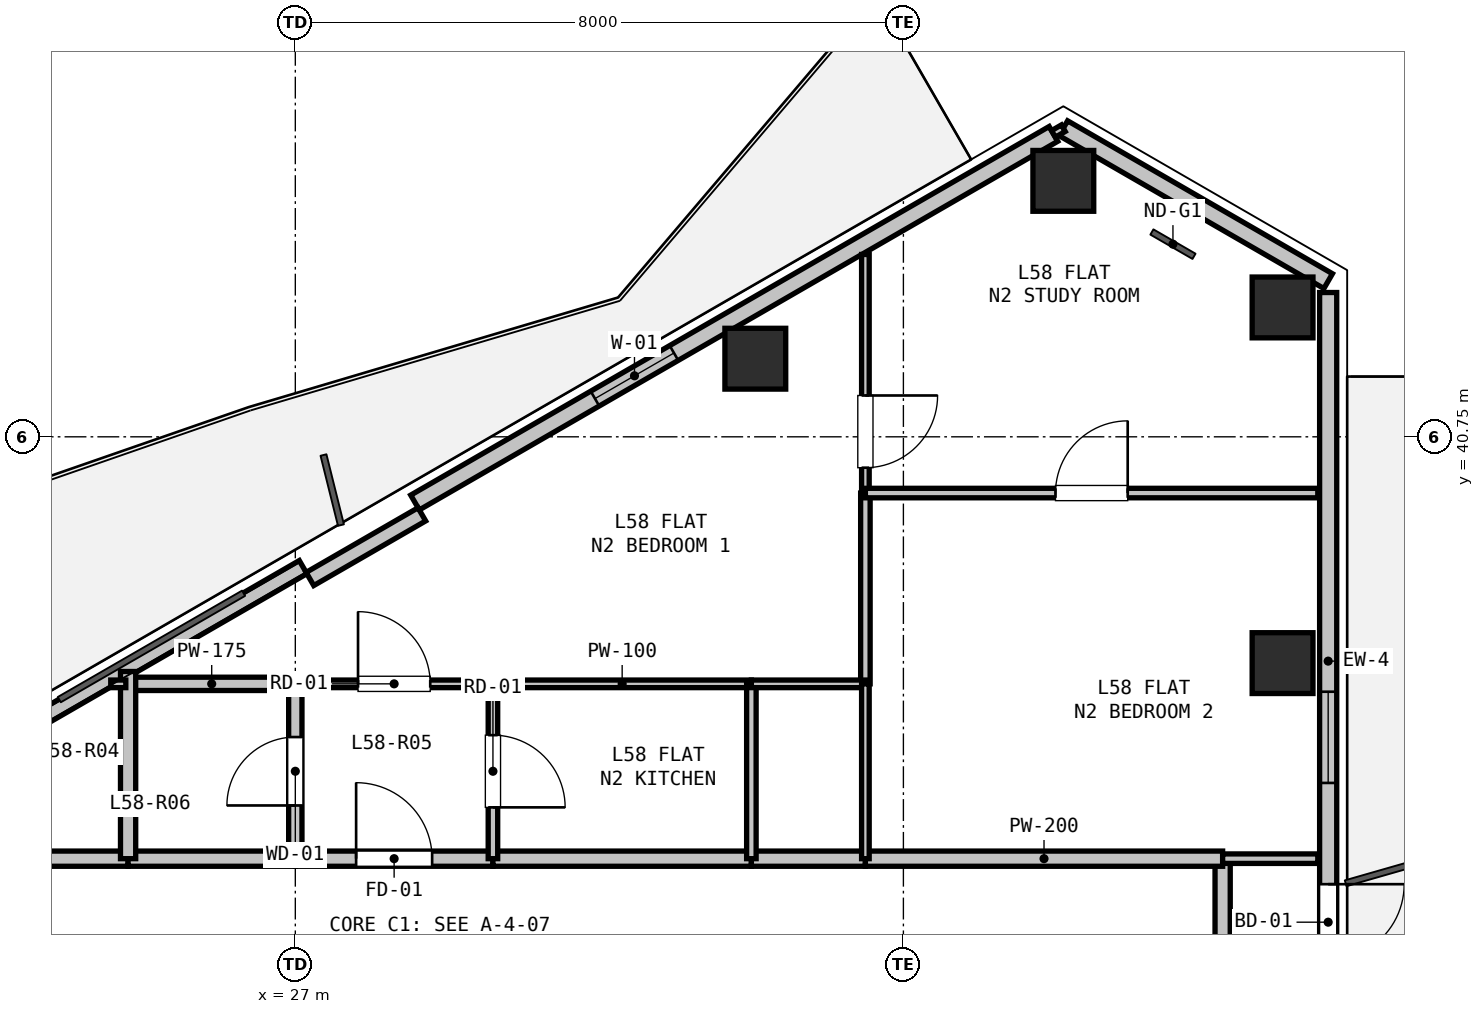
"""IFC4 building model, lengths in metres.
Left out: names, types, materials, properties, quantities, classifications, styles, units other than length and angle.
Written with IfcOpenShell. Run it as: python <this file> out.ifc"""

import sys

from ifc_helpers import new_model, si_unit, direction, frame, frame_2d, origin, origin_2d, place, context, subcontext, project, spatial, rectangle, hollow_rectangle, extrude, element, fill, save


model = new_model("IFC4")
c1 = context("Model", 3, precision=1e-05, world=origin(), true_north=direction((0.0, 1.0)))
c2 = subcontext(c1, "Body", "Model", "MODEL_VIEW")
j1 = project(units=[si_unit("LENGTHUNIT", "METRE"), si_unit("PLANEANGLEUNIT", "RADIAN")], contexts=[c1])
p1 = place(None, origin())
s1 = spatial("IfcSite", under=j1, at=p1, CompositionType="ELEMENT")
p2 = place(p1, origin())
s2 = spatial("IfcBuilding", under=s1, at=p2, CompositionType="ELEMENT")
p3 = place(p2, frame((0.0, 0.0, 208.5)))
s3 = spatial("IfcBuildingStorey", under=s2, at=p3, CompositionType="ELEMENT", Elevation=208.5)
for number, where, z_axis, x_axis in (
    (1, (33.052, 41.778, 0.0), (0.0, 0.0, 1.0), (1.0, 0.0, 0.0)),
    (2, (37.104, 44.117, 0.0), (0.0, 0.0, 1.0), (1.0, 0.0, 0.0)),
    (3, (39.988, 42.452, 0.0), (0.0, 0.0, 1.0), (1.0, 0.0, 0.0)),
    (4, (39.988, 37.773, 0.0), (0.0, 0.0, 1.0), (1.0, 0.0, 0.0)),
):
    element("IfcColumn", number, at=place(p3, frame(where, z_axis=z_axis, x_axis=x_axis)), inside=s3, PredefinedType="COLUMN", context=c2, shape_type="SweptSolid", body=[
        extrude(hollow_rectangle(XDim=0.8, YDim=0.8, WallThickness=0.025, at=origin_2d()), origin(), (0.0, 0.0, 1.0), 3.3),
    ])
p4 = place(p3, frame((37.104, 44.81, 0.0), z_axis=(0.0, 0.0, 1.0), x_axis=(0.866023907196, -0.500002592159, 0.0)))
e5 = element("IfcWall", 5, at=p4, inside=s3, PredefinedType="SOLIDWALL", context=c2, shape_type="SweptSolid", body=[
    extrude(rectangle(XDim=4.023, YDim=0.225, at=frame_2d((2.012, 0.0))), origin(), (0.0, 0.0, 1.0), 2.69),
])
p5 = place(p3, frame((19.309, 34.536, 0.0), z_axis=(0.0, 0.0, 1.0), x_axis=(0.866020680503, 0.500008180874, 0.0)))
e6 = element("IfcWall", 6, at=p5, inside=s3, PredefinedType="PARAPET", context=c2, shape_type="SweptSolid", body=[
    extrude(rectangle(XDim=8.999, YDim=0.2, at=frame_2d((4.5, 0.0))), origin(), (0.0, 0.0, 1.0), 0.2),
])
p6 = place(p3, frame((28.575, 39.885, 0.0), z_axis=(0.0, 0.0, 1.0), x_axis=(0.866016233231, 0.500015883528, 0.0)))
e7 = element("IfcWall", 7, at=p6, inside=s3, PredefinedType="SOLIDWALL", context=c2, shape_type="SweptSolid", body=[
    extrude(rectangle(XDim=9.699, YDim=0.225, at=frame_2d((4.85, 0.0))), origin(), (0.0, 0.0, 1.0), 2.69),
])
p7 = place(p6, frame((2.734, 0.0, 0.9)))
e8 = element("IfcOpeningElement", 8, at=p7, cuts=e7, PredefinedType="OPENING", context=c2, shape_type="SweptSolid", body=[
    extrude(rectangle(XDim=1.2, YDim=1.4, at=frame_2d((0.6, 0.7))), frame((0.0, 0.123, 0.0), z_axis=(0.0, -1.0, 0.0), x_axis=(1.0, 0.0, 0.0)), (0.0, 0.0, 1.0), 0.245),
])
p8 = place(p3, frame((27.192, 38.88, 0.0), z_axis=(0.0, 0.0, 1.0), x_axis=(0.866025371046, 0.500000056704, 0.0)))
e9 = element("IfcWall", 9, at=p8, inside=s3, PredefinedType="PARAPET", context=c2, shape_type="SweptSolid", body=[
    extrude(rectangle(XDim=1.7, YDim=0.2, at=frame_2d((0.85, 0.0))), origin(), (0.0, 0.0, 1.0), 2.69),
])
p9 = place(p3, frame((40.588, 42.648, 0.0), z_axis=(0.0, 0.0, 1.0), x_axis=(0.0, -1.0, 0.0)))
e10 = element("IfcWall", 10, at=p9, inside=s3, PredefinedType="SOLIDWALL", context=c2, shape_type="SweptSolid", body=[
    extrude(rectangle(XDim=9.699, YDim=0.225, at=frame_2d((4.85, 0.0))), origin(), (0.0, 0.0, 1.0), 2.69),
])
p10 = place(p9, frame((7.784, 0.0, 0.0)))
e11 = element("IfcOpeningElement", 11, at=p10, cuts=e10, PredefinedType="OPENING", context=c2, shape_type="SweptSolid", body=[
    extrude(rectangle(XDim=1.0, YDim=2.1, at=frame_2d((0.5, 1.05))), frame((0.0, 0.123, 0.0), z_axis=(0.0, -1.0, 0.0), x_axis=(1.0, 0.0, 0.0)), (0.0, 0.0, 1.0), 0.245),
])
p11 = place(p9, frame((5.252, 0.0, 0.9)))
e12 = element("IfcOpeningElement", 12, at=p11, cuts=e10, PredefinedType="OPENING", context=c2, shape_type="SweptSolid", body=[
    extrude(rectangle(XDim=1.2, YDim=1.4, at=frame_2d((0.6, 0.7))), frame((0.0, 0.123, 0.0), z_axis=(0.0, -1.0, 0.0), x_axis=(1.0, 0.0, 0.0)), (0.0, 0.0, 1.0), 0.245),
])
p12 = place(p3, frame((39.2, 35.2, 0.0), z_axis=(0.0, 0.0, 1.0), x_axis=(0.0, -1.0, 0.0)))
e13 = element("IfcWall", 13, at=p12, inside=s3, PredefinedType="PARTITIONING", context=c2, shape_type="SweptSolid", body=[
    extrude(rectangle(XDim=1.6, YDim=0.2, at=frame_2d((0.8, 0.0))), origin(), (0.0, 0.0, 1.0), 3.07),
])
p13 = place(p3, frame((21.6, 35.2, 0.0), z_axis=(0.0, 0.0, 1.0), x_axis=(1.0, 0.0, 0.0)))
e14 = element("IfcWall", 14, at=p13, inside=s3, PredefinedType="PARTITIONING", context=c2, shape_type="SweptSolid", body=[
    extrude(rectangle(XDim=3.2, YDim=0.2, at=frame_2d((1.6, 0.0))), origin(), (0.0, 0.0, 1.0), 2.365),
])
p14 = place(p13, frame((1.1, 0.0, 0.0)))
e15 = element("IfcOpeningElement", 15, at=p14, cuts=e14, PredefinedType="OPENING", context=c2, shape_type="SweptSolid", body=[
    extrude(rectangle(XDim=1.0, YDim=2.15, at=frame_2d((0.5, 1.075))), frame((0.0, 0.11, 0.0), z_axis=(0.0, -1.0, 0.0), x_axis=(1.0, 0.0, 0.0)), (0.0, 0.0, 1.0), 0.22),
])
p15 = place(p3, frame((24.8, 35.2, 0.0), z_axis=(0.0, 0.0, 1.0), x_axis=(1.0, 0.0, 0.0)))
e16 = element("IfcWall", 16, at=p15, inside=s3, PredefinedType="PARTITIONING", context=c2, shape_type="SweptSolid", body=[
    extrude(rectangle(XDim=2.2, YDim=0.2, at=frame_2d((1.1, 0.0))), origin(), (0.0, 0.0, 1.0), 3.07),
])
p16 = place(p3, frame((27.0, 35.2, 0.0), z_axis=(0.0, 0.0, 1.0), x_axis=(1.0, 0.0, 0.0)))
e17 = element("IfcWall", 17, at=p16, inside=s3, PredefinedType="PARTITIONING", context=c2, shape_type="SweptSolid", body=[
    extrude(rectangle(XDim=2.6, YDim=0.2, at=frame_2d((1.3, 0.0))), origin(), (0.0, 0.0, 1.0), 3.07),
])
p17 = place(p16, frame((0.8, 0.0, 0.0)))
e18 = element("IfcOpeningElement", 18, at=p17, cuts=e17, PredefinedType="OPENING", context=c2, shape_type="SweptSolid", body=[
    extrude(rectangle(XDim=1.0, YDim=2.15, at=frame_2d((0.5, 1.075))), frame((0.0, 0.11, 0.0), z_axis=(0.0, -1.0, 0.0), x_axis=(1.0, 0.0, 0.0)), (0.0, 0.0, 1.0), 0.22),
])
p18 = place(p3, frame((29.6, 35.2, 0.0), z_axis=(0.0, 0.0, 1.0), x_axis=(1.0, 0.0, 0.0)))
e19 = element("IfcWall", 19, at=p18, inside=s3, PredefinedType="PARTITIONING", context=c2, shape_type="SweptSolid", body=[
    extrude(rectangle(XDim=3.4, YDim=0.2, at=frame_2d((1.7, 0.0))), origin(), (0.0, 0.0, 1.0), 3.07),
])
p19 = place(p3, frame((33.0, 35.2, 0.0), z_axis=(0.0, 0.0, 1.0), x_axis=(1.0, 0.0, 0.0)))
e20 = element("IfcWall", 20, at=p19, inside=s3, PredefinedType="PARTITIONING", context=c2, shape_type="SweptSolid", body=[
    extrude(rectangle(XDim=1.5, YDim=0.2, at=frame_2d((0.75, 0.0))), origin(), (0.0, 0.0, 1.0), 3.07),
])
p20 = place(p3, frame((34.5, 35.2, 0.0), z_axis=(0.0, 0.0, 1.0), x_axis=(1.0, 0.0, 0.0)))
e21 = element("IfcWall", 21, at=p20, inside=s3, PredefinedType="PARTITIONING", context=c2, shape_type="SweptSolid", body=[
    extrude(rectangle(XDim=4.7, YDim=0.2, at=frame_2d((2.35, 0.0))), origin(), (0.0, 0.0, 1.0), 2.518),
])
p21 = place(p3, frame((27.0, 37.5, 0.0), z_axis=(0.0, 0.0, 1.0), x_axis=(1.0, 0.0, 0.0)))
e22 = element("IfcWall", 22, at=p21, inside=s3, PredefinedType="PARTITIONING", context=c2, shape_type="SweptSolid", body=[
    extrude(rectangle(XDim=2.6, YDim=0.1, at=frame_2d((1.3, 0.0))), origin(), (0.0, 0.0, 1.0), 3.07),
])
p22 = place(p21, frame((0.825, 0.0, 0.0)))
e23 = element("IfcOpeningElement", 23, at=p22, cuts=e22, PredefinedType="OPENING", context=c2, shape_type="SweptSolid", body=[
    extrude(rectangle(XDim=0.95, YDim=2.1, at=frame_2d((0.475, 1.05))), frame((0.0, 0.06, 0.0), z_axis=(0.0, -1.0, 0.0), x_axis=(1.0, 0.0, 0.0)), (0.0, 0.0, 1.0), 0.12),
])
p23 = place(p3, frame((29.6, 37.5, 0.0), z_axis=(0.0, 0.0, 1.0), x_axis=(0.0, -1.0, 0.0)))
e24 = element("IfcWall", 24, at=p23, inside=s3, PredefinedType="PARTITIONING", context=c2, shape_type="SweptSolid", body=[
    extrude(rectangle(XDim=2.3, YDim=0.125, at=frame_2d((1.15, 0.0))), origin(), (0.0, 0.0, 1.0), 3.07),
])
p24 = place(p23, frame((0.675, 0.0, 0.0)))
e25 = element("IfcOpeningElement", 25, at=p24, cuts=e24, PredefinedType="OPENING", context=c2, shape_type="SweptSolid", body=[
    extrude(rectangle(XDim=0.95, YDim=2.1, at=frame_2d((0.475, 1.05))), frame((0.0, 0.073, 0.0), z_axis=(0.0, -1.0, 0.0), x_axis=(1.0, 0.0, 0.0)), (0.0, 0.0, 1.0), 0.145),
])
p25 = place(p3, frame((27.0, 35.2, 0.0), z_axis=(0.0, 0.0, 1.0), x_axis=(0.0, 1.0, 0.0)))
e26 = element("IfcWall", 26, at=p25, inside=s3, PredefinedType="PLUMBINGWALL", context=c2, shape_type="SweptSolid", body=[
    extrude(rectangle(XDim=2.3, YDim=0.175, at=frame_2d((1.15, 0.0))), origin(), (0.0, 0.0, 1.0), 3.07),
])
p26 = place(p25, frame((0.7, 0.0, 0.0)))
e27 = element("IfcOpeningElement", 27, at=p26, cuts=e26, PredefinedType="OPENING", context=c2, shape_type="SweptSolid", body=[
    extrude(rectangle(XDim=0.9, YDim=2.1, at=frame_2d((0.45, 1.05))), frame((0.0, 0.097, 0.0), z_axis=(0.0, -1.0, 0.0), x_axis=(1.0, 0.0, 0.0)), (0.0, 0.0, 1.0), 0.195),
])
p27 = place(p3, frame((24.8, 37.5, 0.0), z_axis=(0.0, 0.0, 1.0), x_axis=(1.0, 0.0, 0.0)))
e28 = element("IfcWall", 28, at=p27, inside=s3, PredefinedType="PLUMBINGWALL", context=c2, shape_type="SweptSolid", body=[
    extrude(rectangle(XDim=2.2, YDim=0.175, at=frame_2d((1.1, 0.0))), origin(), (0.0, 0.0, 1.0), 2.365),
])
p28 = place(p3, frame((24.8, 35.2, 0.0), z_axis=(0.0, 0.0, 1.0), x_axis=(0.0, 1.0, 0.0)))
e29 = element("IfcWall", 29, at=p28, inside=s3, PredefinedType="PARTITIONING", context=c2, shape_type="SweptSolid", body=[
    extrude(rectangle(XDim=2.462, YDim=0.2, at=frame_2d((1.231, 0.0))), origin(), (0.0, 0.0, 1.0), 2.365),
])
p29 = place(p3, frame((29.6, 37.5, 0.0), z_axis=(0.0, 0.0, 1.0), x_axis=(1.0, 0.0, 0.0)))
e30 = element("IfcWall", 30, at=p29, inside=s3, PredefinedType="PARTITIONING", context=c2, shape_type="SweptSolid", body=[
    extrude(rectangle(XDim=3.4, YDim=0.1, at=frame_2d((1.7, 0.0))), origin(), (0.0, 0.0, 1.0), 3.07),
])
p30 = place(p3, frame((33.0, 37.5, 0.0), z_axis=(0.0, 0.0, 1.0), x_axis=(0.0, -1.0, 0.0)))
e31 = element("IfcWall", 31, at=p30, inside=s3, PredefinedType="PARTITIONING", context=c2, shape_type="SweptSolid", body=[
    extrude(rectangle(XDim=2.3, YDim=0.125, at=frame_2d((1.15, 0.0))), origin(), (0.0, 0.0, 1.0), 3.07),
])
p31 = place(p3, frame((24.572, 37.5, 0.0), z_axis=(0.0, 0.0, 1.0), x_axis=(1.0, 0.0, 0.0)))
e32 = element("IfcWall", 32, at=p31, inside=s3, PredefinedType="PARTITIONING", context=c2, shape_type="SweptSolid", body=[
    extrude(rectangle(XDim=0.198, YDim=0.1, at=frame_2d((0.099, 0.0))), origin(), (0.0, 0.0, 1.0), 3.07),
])
p32 = place(p3, frame((34.5, 43.149, 0.0), z_axis=(0.0, 0.0, 1.0), x_axis=(0.0, -1.0, 0.0)))
e33 = element("IfcWall", 33, at=p32, inside=s3, PredefinedType="PARTITIONING", context=c2, shape_type="SweptSolid", body=[
    extrude(rectangle(XDim=3.139, YDim=0.1, at=frame_2d((1.569, 0.0))), origin(), (0.0, 0.0, 1.0), 2.795),
])
p33 = place(p32, frame((1.855, 0.0, 0.0)))
e34 = element("IfcOpeningElement", 34, at=p33, cuts=e33, PredefinedType="OPENING", context=c2, shape_type="SweptSolid", body=[
    extrude(rectangle(XDim=0.95, YDim=2.1, at=frame_2d((0.475, 1.05))), frame((0.0, 0.06, 0.0), z_axis=(0.0, -1.0, 0.0), x_axis=(1.0, 0.0, 0.0)), (0.0, 0.0, 1.0), 0.12),
])
p34 = place(p3, frame((34.5, 40.01, 0.0), z_axis=(0.0, 0.0, 1.0), x_axis=(0.0, -1.0, 0.0)))
e35 = element("IfcWall", 35, at=p34, inside=s3, PredefinedType="PARTITIONING", context=c2, shape_type="SweptSolid", body=[
    extrude(rectangle(XDim=2.51, YDim=0.125, at=frame_2d((1.255, 0.0))), origin(), (0.0, 0.0, 1.0), 3.07),
])
p35 = place(p3, frame((34.5, 37.5, 0.0), z_axis=(0.0, 0.0, 1.0), x_axis=(-1.0, 0.0, 0.0)))
e36 = element("IfcWall", 36, at=p35, inside=s3, PredefinedType="PARTITIONING", context=c2, shape_type="SweptSolid", body=[
    extrude(rectangle(XDim=1.5, YDim=0.1, at=frame_2d((0.75, 0.0))), origin(), (0.0, 0.0, 1.0), 3.07),
])
p36 = place(p3, frame((40.452, 35.2, 0.0), z_axis=(0.0, 0.0, 1.0), x_axis=(-1.0, 0.0, 0.0)))
e37 = element("IfcWall", 37, at=p36, inside=s3, PredefinedType="PARTITIONING", context=c2, shape_type="SweptSolid", body=[
    extrude(rectangle(XDim=1.252, YDim=0.125, at=frame_2d((0.626, 0.0))), origin(), (0.0, 0.0, 1.0), 2.365),
])
p37 = place(p3, frame((34.5, 35.2, 0.0), z_axis=(0.0, 0.0, 1.0), x_axis=(0.0, 1.0, 0.0)))
e38 = element("IfcWall", 38, at=p37, inside=s3, PredefinedType="PARTITIONING", context=c2, shape_type="SweptSolid", body=[
    extrude(rectangle(XDim=2.3, YDim=0.1, at=frame_2d((1.15, 0.0))), origin(), (0.0, 0.0, 1.0), 3.07),
])
p38 = place(p3, frame((34.5, 40.01, 0.0), z_axis=(0.0, 0.0, 1.0), x_axis=(1.0, 0.0, 0.0)))
e39 = element("IfcWall", 39, at=p38, inside=s3, PredefinedType="PARTITIONING", context=c2, shape_type="SweptSolid", body=[
    extrude(rectangle(XDim=5.952, YDim=0.125, at=frame_2d((2.976, 0.0))), origin(), (0.0, 0.0, 1.0), 2.518),
])
p39 = place(p38, frame((2.501, 0.0, 0.0)))
e40 = element("IfcOpeningElement", 40, at=p39, cuts=e39, PredefinedType="OPENING", context=c2, shape_type="SweptSolid", body=[
    extrude(rectangle(XDim=0.95, YDim=2.1, at=frame_2d((0.475, 1.05))), frame((0.0, 0.073, 0.0), z_axis=(0.0, -1.0, 0.0), x_axis=(1.0, 0.0, 0.0)), (0.0, 0.0, 1.0), 0.145),
])
p40 = place(p3, frame((36.974, 44.735, 0.0), z_axis=(0.0, 0.0, 1.0), x_axis=(0.866131372301, 0.499816412211, 0.0)))
e41 = element("IfcWall", 41, at=p40, inside=s3, PredefinedType="PARTITIONING", context=c2, shape_type="SweptSolid", body=[
    extrude(rectangle(XDim=0.15, YDim=0.1, at=frame_2d((0.075, 0.0))), origin(), (0.0, 0.0, 1.0), 3.07),
])
p41 = place(p7, origin())
e42 = element("IfcWindow", 42, at=p41, inside=s3, PartitioningType="SINGLE_PANEL", PredefinedType="WINDOW", context=c2, shape_type="SweptSolid", body=[
    extrude(rectangle(XDim=1.2, YDim=1.4, at=frame_2d((0.6, 0.7))), frame((0.0, 0.03, 0.0), z_axis=(0.0, -1.0, 0.0), x_axis=(1.0, 0.0, 0.0)), (0.0, 0.0, 1.0), 0.06),
])
fill(e8, e42)
p42 = place(p10, origin())
e43 = element("IfcDoor", 43, at=p42, inside=s3, OperationType="SINGLE_SWING_LEFT", PredefinedType="DOOR", context=c2, shape_type="SweptSolid", body=[
    extrude(rectangle(XDim=1.0, YDim=2.1, at=frame_2d((0.5, 1.05))), frame((0.0, 0.025, 0.0), z_axis=(0.0, -1.0, 0.0), x_axis=(1.0, 0.0, 0.0)), (0.0, 0.0, 1.0), 0.05),
])
fill(e11, e43)
p43 = place(p11, origin())
e44 = element("IfcWindow", 44, at=p43, inside=s3, PartitioningType="SINGLE_PANEL", PredefinedType="WINDOW", context=c2, shape_type="SweptSolid", body=[
    extrude(rectangle(XDim=1.2, YDim=1.4, at=frame_2d((0.6, 0.7))), frame((0.0, 0.03, 0.0), z_axis=(0.0, -1.0, 0.0), x_axis=(1.0, 0.0, 0.0)), (0.0, 0.0, 1.0), 0.06),
])
fill(e12, e44)
p44 = place(p17, origin())
e45 = element("IfcDoor", 45, at=p44, inside=s3, OperationType="SINGLE_SWING_LEFT", PredefinedType="DOOR", context=c2, shape_type="SweptSolid", body=[
    extrude(rectangle(XDim=1.0, YDim=2.15, at=frame_2d((0.5, 1.075))), frame((0.0, 0.025, 0.0), z_axis=(0.0, -1.0, 0.0), x_axis=(1.0, 0.0, 0.0)), (0.0, 0.0, 1.0), 0.05),
])
fill(e18, e45)
p45 = place(p26, origin())
e46 = element("IfcDoor", 46, at=p45, inside=s3, OperationType="SINGLE_SWING_LEFT", PredefinedType="DOOR", context=c2, shape_type="SweptSolid", body=[
    extrude(rectangle(XDim=0.9, YDim=2.1, at=frame_2d((0.45, 1.05))), frame((0.0, 0.025, 0.0), z_axis=(0.0, -1.0, 0.0), x_axis=(1.0, 0.0, 0.0)), (0.0, 0.0, 1.0), 0.05),
])
fill(e27, e46)
p46 = place(p24, origin())
e47 = element("IfcDoor", 47, at=p46, inside=s3, OperationType="SINGLE_SWING_RIGHT", PredefinedType="DOOR", context=c2, shape_type="SweptSolid", body=[
    extrude(rectangle(XDim=0.95, YDim=2.1, at=frame_2d((0.475, 1.05))), frame((0.0, 0.025, 0.0), z_axis=(0.0, -1.0, 0.0), x_axis=(1.0, 0.0, 0.0)), (0.0, 0.0, 1.0), 0.05),
])
fill(e25, e47)
p47 = place(p22, origin())
e48 = element("IfcDoor", 48, at=p47, inside=s3, OperationType="SINGLE_SWING_LEFT", PredefinedType="DOOR", context=c2, shape_type="SweptSolid", body=[
    extrude(rectangle(XDim=0.95, YDim=2.1, at=frame_2d((0.475, 1.05))), frame((0.0, 0.025, 0.0), z_axis=(0.0, -1.0, 0.0), x_axis=(1.0, 0.0, 0.0)), (0.0, 0.0, 1.0), 0.05),
])
fill(e23, e48)
p48 = place(p33, origin())
e49 = element("IfcDoor", 49, at=p48, inside=s3, OperationType="SINGLE_SWING_LEFT", PredefinedType="DOOR", context=c2, shape_type="SweptSolid", body=[
    extrude(rectangle(XDim=0.95, YDim=2.1, at=frame_2d((0.475, 1.05))), frame((0.0, 0.025, 0.0), z_axis=(0.0, -1.0, 0.0), x_axis=(1.0, 0.0, 0.0)), (0.0, 0.0, 1.0), 0.05),
])
fill(e34, e49)
p49 = place(p39, origin())
e50 = element("IfcDoor", 50, at=p49, inside=s3, OperationType="SINGLE_SWING_RIGHT", PredefinedType="DOOR", context=c2, shape_type="SweptSolid", body=[
    extrude(rectangle(XDim=0.95, YDim=2.1, at=frame_2d((0.475, 1.05))), frame((0.0, 0.025, 0.0), z_axis=(0.0, -1.0, 0.0), x_axis=(1.0, 0.0, 0.0)), (0.0, 0.0, 1.0), 0.05),
])
fill(e40, e50)
save(model, sys.argv[1])
